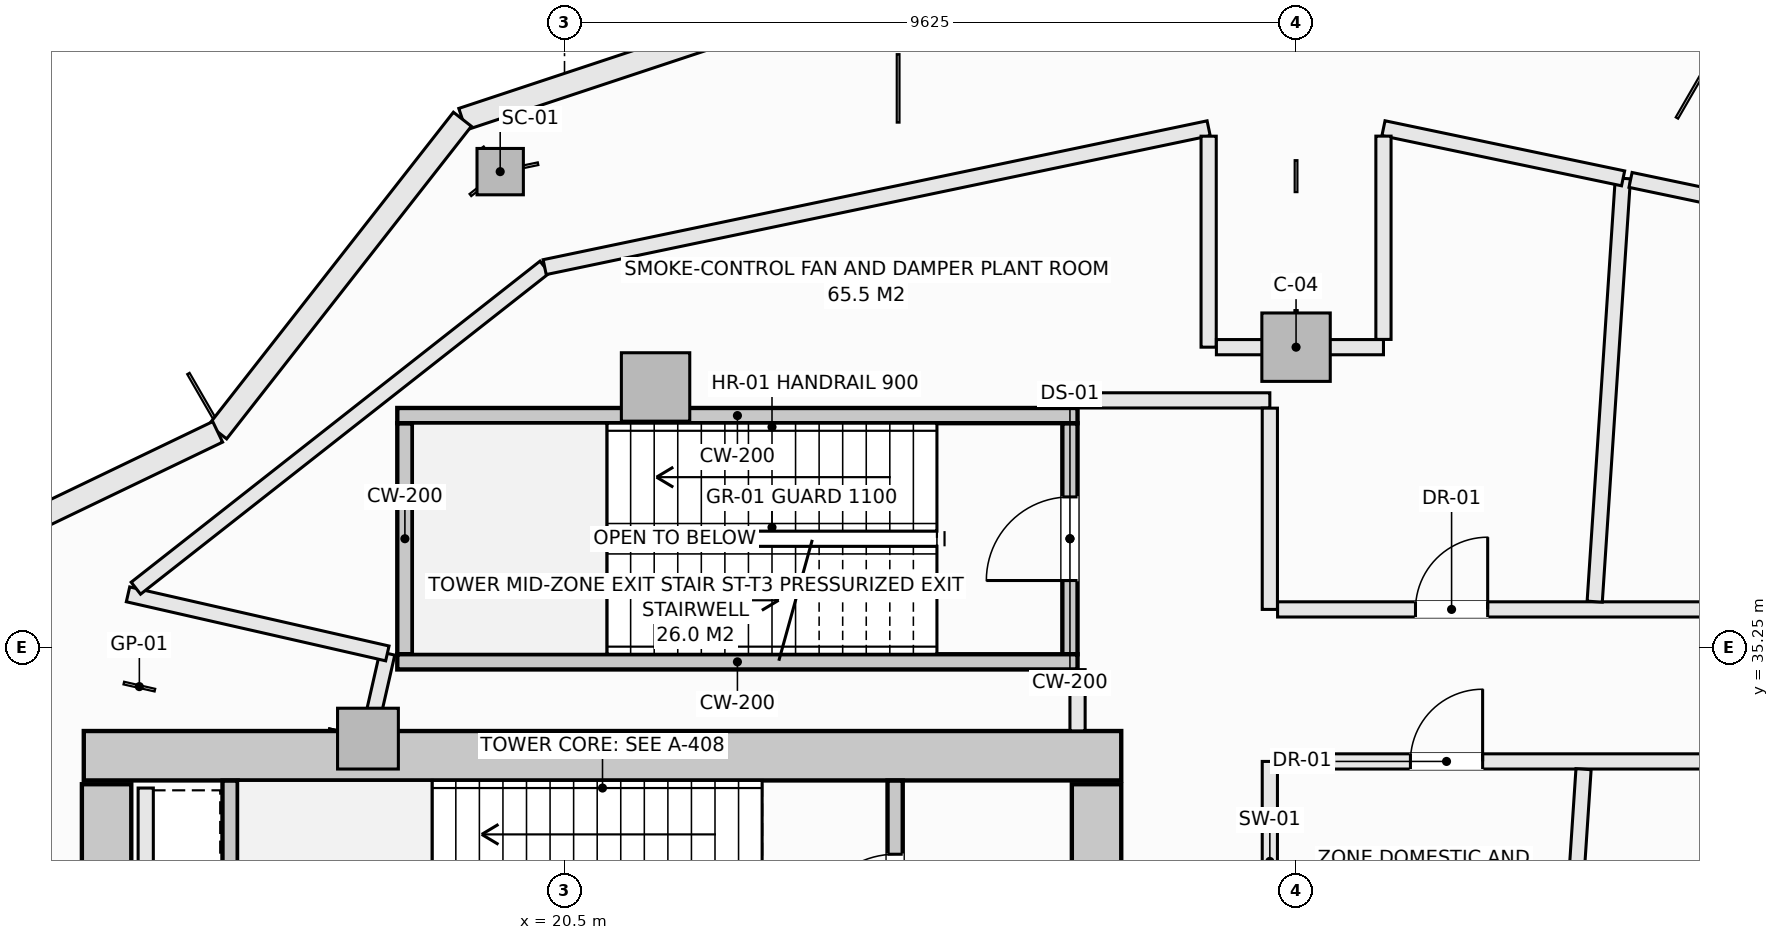
"""IFC4 building model, lengths in metres.
Left out: names, types, materials, properties, quantities, classifications, styles, units other than length and angle.
Written with IfcOpenShell. Run it as: python <this file> out.ifc"""

import sys

from ifc_helpers import new_model, si_unit, direction, frame, frame_2d, origin, origin_2d, place, context, subcontext, project, spatial, rectangle, hollow_rectangle, extrude, element, fill, save


model = new_model("IFC4")
c1 = context("Model", 3, precision=1e-05, world=origin(), true_north=direction((0.0, 1.0)))
c2 = subcontext(c1, "Body", "Model", "MODEL_VIEW")
j1 = project(units=[si_unit("LENGTHUNIT", "METRE"), si_unit("PLANEANGLEUNIT", "RADIAN")], contexts=[c1])
p1 = place(None, origin())
s1 = spatial("IfcSite", under=j1, at=p1, CompositionType="ELEMENT")
p2 = place(p1, origin())
s2 = spatial("IfcBuilding", under=s1, at=p2, CompositionType="ELEMENT")
p3 = place(p2, frame((0.0, 0.0, 186.9)))
s3 = spatial("IfcBuildingStorey", under=s2, at=p3, CompositionType="ELEMENT", Elevation=186.9)
p4 = place(p3, frame((14.175, 33.825, -0.32), z_axis=(0.0, 0.0, 1.0), x_axis=(1.0, 0.0, 0.0)))
e1 = element("IfcWall", 1, at=p4, inside=s3, PredefinedType="SHEAR", context=c2, shape_type="SweptSolid", body=[
    extrude(rectangle(XDim=13.65, YDim=0.65, at=frame_2d((6.825, 0.0))), origin(), (0.0, 0.0, 1.0), 5.04),
])
p5 = place(p3, frame((14.475, 20.55, -0.32), z_axis=(0.0, 0.0, 1.0), x_axis=(0.0, 1.0, 0.0)))
e2 = element("IfcWall", 2, at=p5, inside=s3, PredefinedType="SHEAR", context=c2, shape_type="SweptSolid", body=[
    extrude(rectangle(XDim=12.9, YDim=0.65, at=frame_2d((6.45, 0.0))), origin(), (0.0, 0.0, 1.0), 5.04),
])
p6 = place(p3, frame((27.5, 31.95, -0.32), z_axis=(0.0, 0.0, 1.0), x_axis=(0.0, 1.0, 0.0)))
e3 = element("IfcWall", 3, at=p6, inside=s3, PredefinedType="SHEAR", context=c2, shape_type="SweptSolid", body=[
    extrude(rectangle(XDim=1.5, YDim=0.65, at=frame_2d((0.75, 0.0))), origin(), (0.0, 0.0, 1.0), 5.04),
])
p7 = place(p3, frame((19.654, 41.51, -0.32), z_axis=(0.0, 0.0, 1.0), x_axis=(1.0, 0.0, 0.0)))
e4 = element("IfcColumn", 4, at=p7, inside=s3, PredefinedType="COLUMN", context=c2, shape_type="SweptSolid", body=[
    extrude(hollow_rectangle(XDim=0.61, YDim=0.61, WallThickness=0.025, at=origin_2d()), origin(), (0.0, 0.0, 1.0), 5.04),
])
for number, where, z_axis, x_axis in (
    (5, (30.125, 39.2, -0.32), (0.0, 0.0, 1.0), (1.0, 0.0, 0.0)),
    (6, (21.698, 38.677, -0.32), (0.0, 0.0, 1.0), (1.0, 0.0, 0.0)),
):
    element("IfcColumn", number, at=place(p3, frame(where, z_axis=z_axis, x_axis=x_axis)), inside=s3, PredefinedType="COLUMN", context=c2, shape_type="SweptSolid", body=[
        extrude(rectangle(XDim=0.9, YDim=0.9, at=origin_2d()), origin(), (0.0, 0.0, 1.0), 5.04),
    ])
p8 = place(p3, frame((17.914, 34.05, -0.32), z_axis=(0.0, 0.0, 1.0), x_axis=(1.0, 0.0, 0.0)))
e7 = element("IfcColumn", 7, at=p8, inside=s3, PredefinedType="PILASTER", context=c2, shape_type="SweptSolid", body=[
    extrude(rectangle(XDim=0.8, YDim=0.8, at=origin_2d()), origin(), (0.0, 0.0, 1.0), 5.04),
])
p9 = place(p3, frame((19.156, 42.199, 0.0), z_axis=(0.0, 0.0, 1.0), x_axis=(0.949246811547, 0.314532177636, 0.0)))
e8 = element("IfcWall", 8, at=p9, inside=s3, PredefinedType="SOLIDWALL", context=c2, shape_type="SweptSolid", body=[
    extrude(rectangle(XDim=5.574, YDim=0.3, at=frame_2d((2.787, 0.0))), origin(), (0.0, 0.0, 1.0), 1.15),
])
p10 = place(p3, frame((15.937, 38.086, 0.0), z_axis=(0.0, 0.0, 1.0), x_axis=(0.616429245738, 0.787410302828, 0.0)))
e9 = element("IfcWall", 9, at=p10, inside=s3, PredefinedType="SOLIDWALL", context=c2, shape_type="SweptSolid", body=[
    extrude(rectangle(XDim=5.223, YDim=0.3, at=frame_2d((2.612, 0.0))), origin(), (0.0, 0.0, 1.0), 1.15),
])
p11 = place(p3, frame((11.127, 35.775, 0.0), z_axis=(0.0, 0.0, 1.0), x_axis=(0.901353070301, 0.433085029363, 0.0)))
e10 = element("IfcWall", 10, at=p11, inside=s3, PredefinedType="SOLIDWALL", context=c2, shape_type="SweptSolid", body=[
    extrude(rectangle(XDim=5.336, YDim=0.3, at=frame_2d((2.668, 0.0))), origin(), (0.0, 0.0, 1.0), 1.15),
])
p12 = place(p3, frame((24.85, 30.46, -0.32), z_axis=(0.0, 0.0, 1.0), x_axis=(0.0, 1.0, 0.0)))
e11 = element("IfcWall", 11, at=p12, inside=s3, PredefinedType="SHEAR", context=c2, shape_type="SweptSolid", body=[
    extrude(rectangle(XDim=3.038, YDim=0.2, at=frame_2d((1.519, 0.0))), origin(), (0.0, 0.0, 1.0), 5.04),
])
p13 = place(p12, frame((0.969, 0.0, 0.32)))
e12 = element("IfcOpeningElement", 12, at=p13, cuts=e11, PredefinedType="OPENING", context=c2, shape_type="SweptSolid", body=[
    extrude(rectangle(XDim=1.1, YDim=2.15, at=frame_2d((0.55, 1.075))), frame((0.0, 0.11, 0.0), z_axis=(0.0, -1.0, 0.0), x_axis=(1.0, 0.0, 0.0)), (0.0, 0.0, 1.0), 0.22),
])
p14 = place(p3, frame((16.1, 30.462, -0.32), z_axis=(0.0, 0.0, 1.0), x_axis=(0.0, 1.0, 0.0)))
e13 = element("IfcWall", 13, at=p14, inside=s3, PredefinedType="SHEAR", context=c2, shape_type="SweptSolid", body=[
    extrude(rectangle(XDim=3.036, YDim=0.2, at=frame_2d((1.518, 0.0))), origin(), (0.0, 0.0, 1.0), 5.04),
])
p15 = place(p3, frame((27.15, 35.16, -0.32), z_axis=(0.0, 0.0, 1.0), x_axis=(0.0, 1.0, 0.0)))
e14 = element("IfcWall", 14, at=p15, inside=s3, PredefinedType="SHEAR", context=c2, shape_type="SweptSolid", body=[
    extrude(rectangle(XDim=3.04, YDim=0.2, at=frame_2d((1.52, 0.0))), origin(), (0.0, 0.0, 1.0), 5.04),
])
p16 = place(p15, frame((0.97, 0.0, 0.32)))
e15 = element("IfcOpeningElement", 15, at=p16, cuts=e14, PredefinedType="OPENING", context=c2, shape_type="SweptSolid", body=[
    extrude(rectangle(XDim=1.1, YDim=2.15, at=frame_2d((0.55, 1.075))), frame((0.0, 0.11, 0.0), z_axis=(0.0, -1.0, 0.0), x_axis=(1.0, 0.0, 0.0)), (0.0, 0.0, 1.0), 0.22),
])
p17 = place(p3, frame((18.4, 35.16, -0.32), z_axis=(0.0, 0.0, 1.0), x_axis=(0.0, 1.0, 0.0)))
e16 = element("IfcWall", 16, at=p17, inside=s3, PredefinedType="SHEAR", context=c2, shape_type="SweptSolid", body=[
    extrude(rectangle(XDim=3.04, YDim=0.2, at=frame_2d((1.52, 0.0))), origin(), (0.0, 0.0, 1.0), 5.04),
])
for number, where, z_axis, x_axis in (
    (17, (18.3, 38.3, -0.32), (0.0, 0.0, 1.0), (1.0, 0.0, 0.0)),
    (18, (18.3, 35.06, -0.32), (0.0, 0.0, 1.0), (1.0, 0.0, 0.0)),
):
    element("IfcWall", number, at=place(p3, frame(where, z_axis=z_axis, x_axis=x_axis)), inside=s3, PredefinedType="SHEAR", context=c2, shape_type="SweptSolid", body=[
        extrude(rectangle(XDim=8.95, YDim=0.2, at=frame_2d((4.475, 0.0))), origin(), (0.0, 0.0, 1.0), 5.04),
    ])
p18 = place(p3, frame((14.99, 30.55, 0.0), z_axis=(0.0, 0.0, 1.0), x_axis=(0.0, 1.0, 0.0)))
e19 = element("IfcWall", 19, at=p18, inside=s3, PredefinedType="SOLIDWALL", context=c2, shape_type="SweptSolid", body=[
    extrude(rectangle(XDim=2.85, YDim=0.2, at=frame_2d((1.425, 0.0))), origin(), (0.0, 0.0, 1.0), 4.72),
])
p19 = place(p3, frame((27.25, 34.152, 0.0), z_axis=(0.0, 0.0, 1.0), x_axis=(0.0, 1.0, 0.0)))
e20 = element("IfcWall", 20, at=p19, inside=s3, PredefinedType="SOLIDWALL", context=c2, shape_type="SweptSolid", body=[
    extrude(rectangle(XDim=0.806, YDim=0.2, at=frame_2d((0.403, 0.0))), origin(), (0.0, 0.0, 1.0), 4.72),
])
p20 = place(p3, frame((27.25, 38.5, 0.0), z_axis=(0.0, 0.0, 1.0), x_axis=(1.0, 0.0, 0.0)))
e21 = element("IfcWall", 21, at=p20, inside=s3, PredefinedType="SOLIDWALL", context=c2, shape_type="SweptSolid", body=[
    extrude(rectangle(XDim=2.53, YDim=0.2, at=frame_2d((1.265, 0.0))), origin(), (0.0, 0.0, 1.0), 4.72),
])
p21 = place(p3, frame((29.78, 31.12, 0.0), z_axis=(0.0, 0.0, 1.0), x_axis=(0.0, 1.0, 0.0)))
e22 = element("IfcWall", 22, at=p21, inside=s3, PredefinedType="SOLIDWALL", context=c2, shape_type="SweptSolid", body=[
    extrude(rectangle(XDim=2.63, YDim=0.2, at=frame_2d((1.315, 0.0))), origin(), (0.0, 0.0, 1.0), 4.72),
])
p22 = place(p3, frame((29.78, 35.75, 0.0), z_axis=(0.0, 0.0, 1.0), x_axis=(0.0, 1.0, 0.0)))
e23 = element("IfcWall", 23, at=p22, inside=s3, PredefinedType="SOLIDWALL", context=c2, shape_type="SweptSolid", body=[
    extrude(rectangle(XDim=2.648, YDim=0.2, at=frame_2d((1.324, 0.0))), origin(), (0.0, 0.0, 1.0), 4.72),
])
p23 = place(p3, frame((29.882, 35.75, 0.0), z_axis=(0.0, 0.0, 1.0), x_axis=(1.0, 0.0, 0.0)))
e24 = element("IfcWall", 24, at=p23, inside=s3, PredefinedType="SOLIDWALL", context=c2, shape_type="SweptSolid", body=[
    extrude(rectangle(XDim=8.816, YDim=0.2, at=frame_2d((4.408, 0.0))), origin(), (0.0, 0.0, 1.0), 4.095),
])
p24 = place(p23, frame((1.814, 0.0, 0.0)))
e25 = element("IfcOpeningElement", 25, at=p24, cuts=e24, PredefinedType="OPENING", context=c2, shape_type="SweptSolid", body=[
    extrude(rectangle(XDim=0.95, YDim=2.1, at=frame_2d((0.475, 1.05))), frame((0.0, 0.11, 0.0), z_axis=(0.0, -1.0, 0.0), x_axis=(1.0, 0.0, 0.0)), (0.0, 0.0, 1.0), 0.22),
])
p25 = place(p3, frame((29.882, 33.75, 0.0), z_axis=(0.0, 0.0, 1.0), x_axis=(1.0, 0.0, 0.0)))
e26 = element("IfcWall", 26, at=p25, inside=s3, PredefinedType="SOLIDWALL", context=c2, shape_type="SweptSolid", body=[
    extrude(rectangle(XDim=8.816, YDim=0.2, at=frame_2d((4.408, 0.0))), origin(), (0.0, 0.0, 1.0), 4.72),
])
p26 = place(p25, frame((1.748, 0.0, 0.0)))
e27 = element("IfcOpeningElement", 27, at=p26, cuts=e26, PredefinedType="OPENING", context=c2, shape_type="SweptSolid", body=[
    extrude(rectangle(XDim=0.95, YDim=2.1, at=frame_2d((0.475, 1.05))), frame((0.0, 0.11, 0.0), z_axis=(0.0, -1.0, 0.0), x_axis=(1.0, 0.0, 0.0)), (0.0, 0.0, 1.0), 0.22),
])
p27 = place(p3, frame((33.746, 31.222, 0.0), z_axis=(0.0, 0.0, 1.0), x_axis=(0.066472359128, 0.997788266854, 0.0)))
e28 = element("IfcWall", 28, at=p27, inside=s3, PredefinedType="SOLIDWALL", context=c2, shape_type="SweptSolid", body=[
    extrude(rectangle(XDim=2.431, YDim=0.2, at=frame_2d((1.216, 0.0))), origin(), (0.0, 0.0, 1.0), 4.72),
])
p28 = place(p3, frame((34.054, 35.852, 0.0), z_axis=(0.0, 0.0, 1.0), x_axis=(0.066399978294, 0.997793086207, 0.0)))
e29 = element("IfcWall", 29, at=p28, inside=s3, PredefinedType="SOLIDWALL", context=c2, shape_type="SweptSolid", body=[
    extrude(rectangle(XDim=5.581, YDim=0.2, at=frame_2d((2.791, 0.0))), origin(), (0.0, 0.0, 1.0), 4.402),
])
p29 = place(p3, frame((31.275, 42.081, 0.0), z_axis=(0.0, 0.0, 1.0), x_axis=(0.978789564925, -0.204868220071, 0.0)))
e30 = element("IfcWall", 30, at=p29, inside=s3, PredefinedType="SOLIDWALL", context=c2, shape_type="SweptSolid", body=[
    extrude(rectangle(XDim=3.221, YDim=0.2, at=frame_2d((1.611, 0.0))), origin(), (0.0, 0.0, 1.0), 4.72),
])
p30 = place(p3, frame((34.526, 41.4, 0.0), z_axis=(0.0, 0.0, 1.0), x_axis=(0.978797539927, -0.204830114567, 0.0)))
e31 = element("IfcWall", 31, at=p30, inside=s3, PredefinedType="SOLIDWALL", context=c2, shape_type="SweptSolid", body=[
    extrude(rectangle(XDim=3.951, YDim=0.2, at=frame_2d((1.976, 0.0))), origin(), (0.0, 0.0, 1.0), 4.72),
])
p31 = place(p3, frame((17.937, 34.152, 0.0), z_axis=(0.0, 0.0, 1.0), x_axis=(0.221974559012, 0.975052457641, 0.0)))
e32 = element("IfcWall", 32, at=p31, inside=s3, PredefinedType="SOLIDWALL", context=c2, shape_type="SweptSolid", body=[
    extrude(rectangle(XDim=1.045, YDim=0.2, at=frame_2d((0.522, 0.0))), origin(), (0.0, 0.0, 1.0), 4.72),
])
p32 = place(p3, frame((14.757, 35.948, 0.0), z_axis=(0.0, 0.0, 1.0), x_axis=(0.975029260281, -0.222076431877, 0.0)))
e33 = element("IfcWall", 33, at=p32, inside=s3, PredefinedType="SOLIDWALL", context=c2, shape_type="SweptSolid", body=[
    extrude(rectangle(XDim=3.499, YDim=0.2, at=frame_2d((1.75, 0.0))), origin(), (0.0, 0.0, 1.0), 4.72),
])
p33 = place(p3, frame((14.86, 36.029, 0.0), z_axis=(0.0, 0.0, 1.0), x_axis=(0.786475634876, 0.617621304479, 0.0)))
e34 = element("IfcWall", 34, at=p33, inside=s3, PredefinedType="SOLIDWALL", context=c2, shape_type="SweptSolid", body=[
    extrude(rectangle(XDim=6.839, YDim=0.2, at=frame_2d((3.419, 0.0))), origin(), (0.0, 0.0, 1.0), 4.72),
])
p34 = place(p3, frame((20.239, 40.253, 0.0), z_axis=(0.0, 0.0, 1.0), x_axis=(0.97882059117, 0.204719931373, 0.0)))
e35 = element("IfcWall", 35, at=p34, inside=s3, PredefinedType="SOLIDWALL", context=c2, shape_type="SweptSolid", body=[
    extrude(rectangle(XDim=8.925, YDim=0.2, at=frame_2d((4.462, 0.0))), origin(), (0.0, 0.0, 1.0), 4.72),
])
p35 = place(p3, frame((28.975, 39.2, 0.0), z_axis=(0.0, 0.0, 1.0), x_axis=(0.0, 1.0, 0.0)))
e36 = element("IfcWall", 36, at=p35, inside=s3, PredefinedType="SOLIDWALL", context=c2, shape_type="SweptSolid", body=[
    extrude(rectangle(XDim=2.776, YDim=0.2, at=frame_2d((1.388, 0.0))), origin(), (0.0, 0.0, 1.0), 4.72),
])
p36 = place(p3, frame((29.077, 39.2, 0.0), z_axis=(0.0, 0.0, 1.0), x_axis=(1.0, 0.0, 0.0)))
e37 = element("IfcWall", 37, at=p36, inside=s3, PredefinedType="SOLIDWALL", context=c2, shape_type="SweptSolid", body=[
    extrude(rectangle(XDim=2.198, YDim=0.2, at=frame_2d((1.099, 0.0))), origin(), (0.0, 0.0, 1.0), 4.095),
])
p37 = place(p3, frame((31.275, 39.302, 0.0), z_axis=(0.0, 0.0, 1.0), x_axis=(0.0, 1.0, 0.0)))
e38 = element("IfcWall", 38, at=p37, inside=s3, PredefinedType="SOLIDWALL", context=c2, shape_type="SweptSolid", body=[
    extrude(rectangle(XDim=2.675, YDim=0.2, at=frame_2d((1.337, 0.0))), origin(), (0.0, 0.0, 1.0), 4.72),
])
p38 = place(p13, origin())
e39 = element("IfcDoor", 39, at=p38, inside=s3, OperationType="SINGLE_SWING_LEFT", PredefinedType="DOOR", context=c2, shape_type="SweptSolid", body=[
    extrude(rectangle(XDim=1.1, YDim=2.15, at=frame_2d((0.55, 1.075))), frame((0.0, 0.025, 0.0), z_axis=(0.0, -1.0, 0.0), x_axis=(1.0, 0.0, 0.0)), (0.0, 0.0, 1.0), 0.05),
])
fill(e12, e39)
p39 = place(p16, origin())
e40 = element("IfcDoor", 40, at=p39, inside=s3, OperationType="SINGLE_SWING_LEFT", PredefinedType="DOOR", context=c2, shape_type="SweptSolid", body=[
    extrude(rectangle(XDim=1.1, YDim=2.15, at=frame_2d((0.55, 1.075))), frame((0.0, 0.025, 0.0), z_axis=(0.0, -1.0, 0.0), x_axis=(1.0, 0.0, 0.0)), (0.0, 0.0, 1.0), 0.05),
])
fill(e15, e40)
p40 = place(p26, origin())
e41 = element("IfcDoor", 41, at=p40, inside=s3, OperationType="SINGLE_SWING_RIGHT", PredefinedType="DOOR", context=c2, shape_type="SweptSolid", body=[
    extrude(rectangle(XDim=0.95, YDim=2.1, at=frame_2d((0.475, 1.05))), frame((0.0, 0.025, 0.0), z_axis=(0.0, -1.0, 0.0), x_axis=(1.0, 0.0, 0.0)), (0.0, 0.0, 1.0), 0.05),
])
fill(e27, e41)
p41 = place(p24, origin())
e42 = element("IfcDoor", 42, at=p41, inside=s3, OperationType="SINGLE_SWING_RIGHT", PredefinedType="DOOR", context=c2, shape_type="SweptSolid", body=[
    extrude(rectangle(XDim=0.95, YDim=2.1, at=frame_2d((0.475, 1.05))), frame((0.0, 0.025, 0.0), z_axis=(0.0, -1.0, 0.0), x_axis=(1.0, 0.0, 0.0)), (0.0, 0.0, 1.0), 0.05),
])
fill(e25, e42)
save(model, sys.argv[1])
